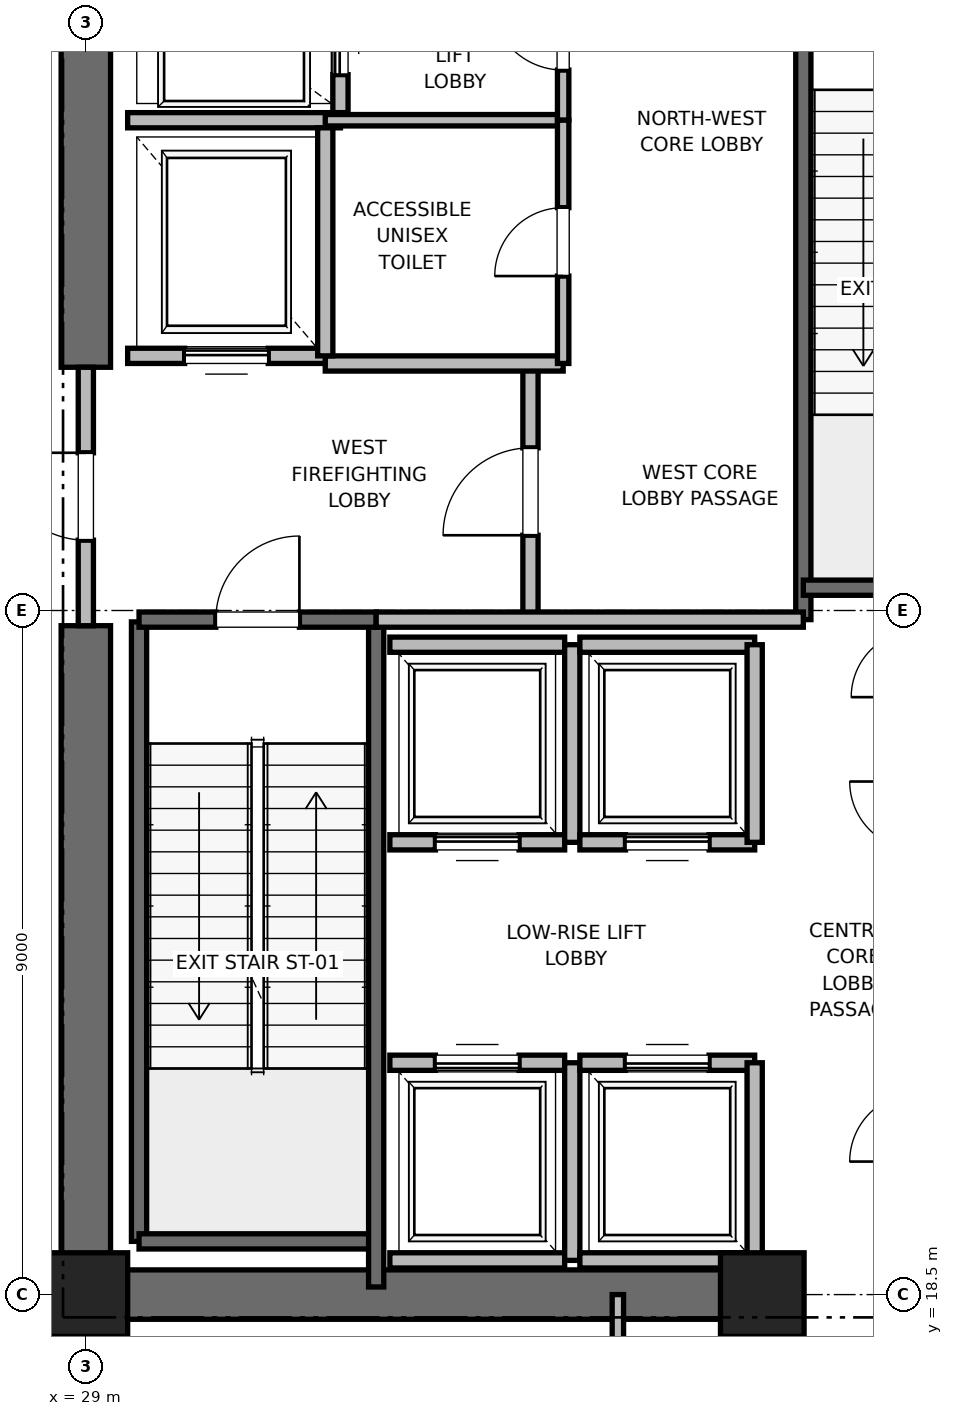
"""IFC4 building model, lengths in metres.
Left out: names, types, materials, properties, quantities, classifications, styles, units other than length and angle.
Written with IfcOpenShell. Run it as: python <this file> out.ifc"""

import sys

from ifc_helpers import new_model, si_unit, direction, frame, frame_2d, origin, origin_2d, place, context, subcontext, project, spatial, rectangle, extrude, element, fill, save


model = new_model("IFC4")
c1 = context("Model", 3, precision=1e-05, world=origin(), true_north=direction((0.0, 1.0)))
c2 = subcontext(c1, "Body", "Model", "MODEL_VIEW")
j1 = project(units=[si_unit("LENGTHUNIT", "METRE"), si_unit("PLANEANGLEUNIT", "RADIAN")], contexts=[c1])
p1 = place(None, origin())
s1 = spatial("IfcSite", under=j1, at=p1, CompositionType="ELEMENT")
p2 = place(p1, origin())
s2 = spatial("IfcBuilding", under=s1, at=p2, CompositionType="ELEMENT")
p3 = place(p2, frame((0.0, 0.0, 107.6)))
s3 = spatial("IfcBuildingStorey", under=s2, at=p3, CompositionType="ELEMENT", Elevation=107.6)
for number, where, z_axis, x_axis in (
    (1, (29.0, 18.5, 0.0), (0.0, 0.0, 1.0), (1.0, 0.0, 0.0)),
    (2, (37.9, 18.5, 0.0), (0.0, 0.0, 1.0), (1.0, 0.0, 0.0)),
):
    element("IfcColumn", number, at=place(p3, frame(where, z_axis=z_axis, x_axis=x_axis)), inside=s3, PredefinedType="PILASTER", context=c2, shape_type="SweptSolid", body=[
        extrude(rectangle(XDim=1.1, YDim=1.1, at=origin_2d()), origin(), (0.0, 0.0, 1.0), 5.4),
    ])
p4 = place(p3, frame((29.0, 18.5, 0.0), z_axis=(0.0, 0.0, 1.0), x_axis=(1.0, 0.0, 0.0)))
e3 = element("IfcWall", 3, at=p4, inside=s3, PredefinedType="SHEAR", context=c2, shape_type="SweptSolid", body=[
    extrude(rectangle(XDim=9.2, YDim=0.65, at=frame_2d((4.6, 0.0))), origin(), (0.0, 0.0, 1.0), 5.1),
])
p5 = place(p3, frame((29.0, 18.5, 0.0), z_axis=(0.0, 0.0, 1.0), x_axis=(0.0, 1.0, 0.0)))
e4 = element("IfcWall", 4, at=p5, inside=s3, PredefinedType="SHEAR", context=c2, shape_type="SweptSolid", body=[
    extrude(rectangle(XDim=8.8, YDim=0.65, at=frame_2d((4.4, 0.0))), origin(), (0.0, 0.0, 1.0), 5.1),
])
p6 = place(p3, frame((29.0, 30.7, 0.0), z_axis=(0.0, 0.0, 1.0), x_axis=(0.0, 1.0, 0.0)))
e5 = element("IfcWall", 5, at=p6, inside=s3, PredefinedType="SHEAR", context=c2, shape_type="SweptSolid", body=[
    extrude(rectangle(XDim=5.8, YDim=0.65, at=frame_2d((2.9, 0.0))), origin(), (0.0, 0.0, 1.0), 5.1),
])
p7 = place(p3, frame((29.7, 19.2, 0.0), z_axis=(0.0, 0.0, 1.0), x_axis=(0.0, 1.0, 0.0)))
e6 = element("IfcWall", 6, at=p7, inside=s3, PredefinedType="SOLIDWALL", context=c2, shape_type="SweptSolid", body=[
    extrude(rectangle(XDim=8.15, YDim=0.2, at=frame_2d((4.075, 0.0))), origin(), (0.0, 0.0, 1.0), 5.1),
])
p8 = place(p3, frame((29.7, 19.2, 0.0), z_axis=(0.0, 0.0, 1.0), x_axis=(1.0, 0.0, 0.0)))
e7 = element("IfcWall", 7, at=p8, inside=s3, PredefinedType="SOLIDWALL", context=c2, shape_type="SweptSolid", body=[
    extrude(rectangle(XDim=3.12, YDim=0.2, at=frame_2d((1.56, 0.0))), origin(), (0.0, 0.0, 1.0), 5.1),
])
p9 = place(p3, frame((32.82, 18.6, 0.0), z_axis=(0.0, 0.0, 1.0), x_axis=(0.0, 1.0, 0.0)))
e8 = element("IfcWall", 8, at=p9, inside=s3, PredefinedType="SOLIDWALL", context=c2, shape_type="SweptSolid", body=[
    extrude(rectangle(XDim=8.78, YDim=0.2, at=frame_2d((4.39, 0.0))), origin(), (0.0, 0.0, 1.0), 5.1),
])
p10 = place(p3, frame((29.7, 27.38, 0.0), z_axis=(0.0, 0.0, 1.0), x_axis=(1.0, 0.0, 0.0)))
e9 = element("IfcWall", 9, at=p10, inside=s3, PredefinedType="SOLIDWALL", context=c2, shape_type="SweptSolid", body=[
    extrude(rectangle(XDim=3.12, YDim=0.2, at=frame_2d((1.56, 0.0))), origin(), (0.0, 0.0, 1.0), 5.1),
])
p11 = place(p10, frame((1.01, 0.0, 0.0)))
e10 = element("IfcOpeningElement", 10, at=p11, cuts=e9, PredefinedType="OPENING", context=c2, shape_type="SweptSolid", body=[
    extrude(rectangle(XDim=1.1, YDim=2.15, at=frame_2d((0.55, 1.075))), frame((0.0, 0.1, 0.0), z_axis=(0.0, -1.0, 0.0), x_axis=(1.0, 0.0, 0.0)), (0.0, 0.0, 1.0), 0.2),
])
p12 = place(p3, frame((38.44, 27.38, 0.0), z_axis=(0.0, 0.0, 1.0), x_axis=(0.0, 1.0, 0.0)))
e11 = element("IfcWall", 11, at=p12, inside=s3, PredefinedType="SOLIDWALL", context=c2, shape_type="SweptSolid", body=[
    extrude(rectangle(XDim=8.87, YDim=0.2, at=frame_2d((4.435, 0.0))), origin(), (0.0, 0.0, 1.0), 5.1),
])
p13 = place(p3, frame((38.44, 27.8, 0.0), z_axis=(0.0, 0.0, 1.0), x_axis=(1.0, 0.0, 0.0)))
e12 = element("IfcWall", 12, at=p13, inside=s3, PredefinedType="SOLIDWALL", context=c2, shape_type="SweptSolid", body=[
    extrude(rectangle(XDim=3.32, YDim=0.2, at=frame_2d((1.66, 0.0))), origin(), (0.0, 0.0, 1.0), 5.1),
])
p14 = place(p3, frame((34.85, 27.38, 0.0), z_axis=(0.0, 0.0, 1.0), x_axis=(0.0, 1.0, 0.0)))
e13 = element("IfcWall", 13, at=p14, inside=s3, PredefinedType="PARTITIONING", context=c2, shape_type="SweptSolid", body=[
    extrude(rectangle(XDim=3.37, YDim=0.2, at=frame_2d((1.685, 0.0))), origin(), (0.0, 0.0, 1.0), 5.1),
])
p15 = place(p14, frame((1.11, 0.0, 0.0)))
e14 = element("IfcOpeningElement", 14, at=p15, cuts=e13, PredefinedType="OPENING", context=c2, shape_type="SweptSolid", body=[
    extrude(rectangle(XDim=1.15, YDim=2.2, at=frame_2d((0.575, 1.1))), frame((0.0, 0.1, 0.0), z_axis=(0.0, -1.0, 0.0), x_axis=(1.0, 0.0, 0.0)), (0.0, 0.0, 1.0), 0.2),
])
p16 = place(p3, frame((29.0, 27.3, 0.0), z_axis=(0.0, 0.0, 1.0), x_axis=(0.0, 1.0, 0.0)))
e15 = element("IfcWall", 15, at=p16, inside=s3, PredefinedType="PARTITIONING", context=c2, shape_type="SweptSolid", body=[
    extrude(rectangle(XDim=3.4, YDim=0.2, at=frame_2d((1.7, 0.0))), origin(), (0.0, 0.0, 1.0), 3.88),
])
p17 = place(p16, frame((1.125, 0.0, 0.0)))
e16 = element("IfcOpeningElement", 16, at=p17, cuts=e15, PredefinedType="OPENING", context=c2, shape_type="SweptSolid", body=[
    extrude(rectangle(XDim=1.15, YDim=2.2, at=frame_2d((0.575, 1.1))), frame((0.0, 0.1, 0.0), z_axis=(0.0, -1.0, 0.0), x_axis=(1.0, 0.0, 0.0)), (0.0, 0.0, 1.0), 0.2),
])
p18 = place(p3, frame((32.82, 27.38, 0.0), z_axis=(0.0, 0.0, 1.0), x_axis=(1.0, 0.0, 0.0)))
e17 = element("IfcWall", 17, at=p18, inside=s3, PredefinedType="PARTITIONING", context=c2, shape_type="SweptSolid", body=[
    extrude(rectangle(XDim=5.62, YDim=0.2, at=frame_2d((2.81, 0.0))), origin(), (0.0, 0.0, 1.0), 5.1),
])
p19 = place(p3, frame((32.15, 30.75, 0.0), z_axis=(0.0, 0.0, 1.0), x_axis=(1.0, 0.0, 0.0)))
e18 = element("IfcWall", 18, at=p19, inside=s3, PredefinedType="PARTITIONING", context=c2, shape_type="SweptSolid", body=[
    extrude(rectangle(XDim=3.13, YDim=0.2, at=frame_2d((1.565, 0.0))), origin(), (0.0, 0.0, 1.0), 5.1),
])
p20 = place(p3, frame((29.55, 30.85, 0.0), z_axis=(0.0, 0.0, 1.0), x_axis=(1.0, 0.0, 0.0)))
e19 = element("IfcWall", 19, at=p20, inside=s3, PredefinedType="SOLIDWALL", context=c2, shape_type="SweptSolid", body=[
    extrude(rectangle(XDim=2.6, YDim=0.2, at=frame_2d((1.3, 0.0))), origin(), (0.0, 0.0, 1.0), 3.88),
])
p21 = place(p20, frame((0.75, 0.0, 0.0)))
e20 = element("IfcOpeningElement", 20, at=p21, cuts=e19, PredefinedType="OPENING", context=c2, shape_type="SweptSolid", body=[
    extrude(rectangle(XDim=1.1, YDim=2.2, at=frame_2d((0.55, 1.1))), frame((0.0, 0.1, 0.0), z_axis=(0.0, -1.0, 0.0), x_axis=(1.0, 0.0, 0.0)), (0.0, 0.0, 1.0), 0.2),
])
p22 = place(p3, frame((29.55, 33.95, 0.0), z_axis=(0.0, 0.0, 1.0), x_axis=(1.0, 0.0, 0.0)))
e21 = element("IfcWall", 21, at=p22, inside=s3, PredefinedType="SOLIDWALL", context=c2, shape_type="SweptSolid", body=[
    extrude(rectangle(XDim=2.8, YDim=0.2, at=frame_2d((1.4, 0.0))), origin(), (0.0, 0.0, 1.0), 5.1),
])
p23 = place(p3, frame((32.15, 30.85, 0.0), z_axis=(0.0, 0.0, 1.0), x_axis=(0.0, 1.0, 0.0)))
e22 = element("IfcWall", 22, at=p23, inside=s3, PredefinedType="SOLIDWALL", context=c2, shape_type="SweptSolid", body=[
    extrude(rectangle(XDim=3.0, YDim=0.2, at=frame_2d((1.5, 0.0))), origin(), (0.0, 0.0, 1.0), 5.1),
])
p24 = place(p3, frame((32.35, 34.05, 0.0), z_axis=(0.0, 0.0, 1.0), x_axis=(0.0, 1.0, 0.0)))
e23 = element("IfcWall", 23, at=p24, inside=s3, PredefinedType="SOLIDWALL", context=c2, shape_type="SweptSolid", body=[
    extrude(rectangle(XDim=2.1, YDim=0.2, at=frame_2d((1.05, 0.0))), origin(), (0.0, 0.0, 1.0), 5.1),
])
p25 = place(p24, frame((0.5, 0.0, 0.0)))
e24 = element("IfcOpeningElement", 24, at=p25, cuts=e23, PredefinedType="OPENING", context=c2, shape_type="SweptSolid", body=[
    extrude(rectangle(XDim=1.1, YDim=2.2, at=frame_2d((0.55, 1.1))), frame((0.0, 0.1, 0.0), z_axis=(0.0, -1.0, 0.0), x_axis=(1.0, 0.0, 0.0)), (0.0, 0.0, 1.0), 0.2),
])
p26 = place(p3, frame((33.0, 18.95, 0.0), z_axis=(0.0, 0.0, 1.0), x_axis=(1.0, 0.0, 0.0)))
e25 = element("IfcWall", 25, at=p26, inside=s3, PredefinedType="SOLIDWALL", context=c2, shape_type="SweptSolid", body=[
    extrude(rectangle(XDim=2.3, YDim=0.2, at=frame_2d((1.15, 0.0))), origin(), (0.0, 0.0, 1.0), 5.1),
])
p27 = place(p3, frame((35.3, 21.55, 0.0), z_axis=(0.0, 0.0, 1.0), x_axis=(-1.0, 0.0, 0.0)))
e26 = element("IfcWall", 26, at=p27, inside=s3, PredefinedType="SOLIDWALL", context=c2, shape_type="SweptSolid", body=[
    extrude(rectangle(XDim=2.3, YDim=0.2, at=frame_2d((1.15, 0.0))), origin(), (0.0, 0.0, 1.0), 5.1),
])
p28 = place(p27, frame((0.6, 0.0, 0.0)))
e27 = element("IfcOpeningElement", 27, at=p28, cuts=e26, PredefinedType="OPENING", context=c2, shape_type="SweptSolid", body=[
    extrude(rectangle(XDim=1.1, YDim=2.2, at=frame_2d((0.55, 1.1))), frame((0.0, 0.1, 0.0), z_axis=(0.0, -1.0, 0.0), x_axis=(1.0, 0.0, 0.0)), (0.0, 0.0, 1.0), 0.2),
])
p29 = place(p3, frame((35.4, 18.95, 0.0), z_axis=(0.0, 0.0, 1.0), x_axis=(0.0, 1.0, 0.0)))
e28 = element("IfcWall", 28, at=p29, inside=s3, PredefinedType="SOLIDWALL", context=c2, shape_type="SweptSolid", body=[
    extrude(rectangle(XDim=2.6, YDim=0.2, at=frame_2d((1.3, 0.0))), origin(), (0.0, 0.0, 1.0), 5.1),
])
p30 = place(p3, frame((35.5, 18.95, 0.0), z_axis=(0.0, 0.0, 1.0), x_axis=(1.0, 0.0, 0.0)))
e29 = element("IfcWall", 29, at=p30, inside=s3, PredefinedType="SOLIDWALL", context=c2, shape_type="SweptSolid", body=[
    extrude(rectangle(XDim=2.3, YDim=0.2, at=frame_2d((1.15, 0.0))), origin(), (0.0, 0.0, 1.0), 3.88),
])
p31 = place(p3, frame((37.8, 21.55, 0.0), z_axis=(0.0, 0.0, 1.0), x_axis=(-1.0, 0.0, 0.0)))
e30 = element("IfcWall", 30, at=p31, inside=s3, PredefinedType="SOLIDWALL", context=c2, shape_type="SweptSolid", body=[
    extrude(rectangle(XDim=2.3, YDim=0.2, at=frame_2d((1.15, 0.0))), origin(), (0.0, 0.0, 1.0), 5.1),
])
p32 = place(p31, frame((0.6, 0.0, 0.0)))
e31 = element("IfcOpeningElement", 31, at=p32, cuts=e30, PredefinedType="OPENING", context=c2, shape_type="SweptSolid", body=[
    extrude(rectangle(XDim=1.1, YDim=2.2, at=frame_2d((0.55, 1.1))), frame((0.0, 0.1, 0.0), z_axis=(0.0, -1.0, 0.0), x_axis=(1.0, 0.0, 0.0)), (0.0, 0.0, 1.0), 0.2),
])
p33 = place(p3, frame((37.8, 18.95, 0.0), z_axis=(0.0, 0.0, 1.0), x_axis=(0.0, 1.0, 0.0)))
e32 = element("IfcWall", 32, at=p33, inside=s3, PredefinedType="SOLIDWALL", context=c2, shape_type="SweptSolid", body=[
    extrude(rectangle(XDim=2.6, YDim=0.2, at=frame_2d((1.3, 0.0))), origin(), (0.0, 0.0, 1.0), 3.88),
])
p34 = place(p3, frame((33.0, 24.45, 0.0), z_axis=(0.0, 0.0, 1.0), x_axis=(1.0, 0.0, 0.0)))
e33 = element("IfcWall", 33, at=p34, inside=s3, PredefinedType="SOLIDWALL", context=c2, shape_type="SweptSolid", body=[
    extrude(rectangle(XDim=2.3, YDim=0.2, at=frame_2d((1.15, 0.0))), origin(), (0.0, 0.0, 1.0), 5.1),
])
p35 = place(p34, frame((0.6, 0.0, 0.0)))
e34 = element("IfcOpeningElement", 34, at=p35, cuts=e33, PredefinedType="OPENING", context=c2, shape_type="SweptSolid", body=[
    extrude(rectangle(XDim=1.1, YDim=2.2, at=frame_2d((0.55, 1.1))), frame((0.0, 0.1, 0.0), z_axis=(0.0, -1.0, 0.0), x_axis=(1.0, 0.0, 0.0)), (0.0, 0.0, 1.0), 0.2),
])
p36 = place(p3, frame((35.3, 27.05, 0.0), z_axis=(0.0, 0.0, 1.0), x_axis=(-1.0, 0.0, 0.0)))
e35 = element("IfcWall", 35, at=p36, inside=s3, PredefinedType="SOLIDWALL", context=c2, shape_type="SweptSolid", body=[
    extrude(rectangle(XDim=2.3, YDim=0.2, at=frame_2d((1.15, 0.0))), origin(), (0.0, 0.0, 1.0), 5.1),
])
p37 = place(p3, frame((35.4, 24.45, 0.0), z_axis=(0.0, 0.0, 1.0), x_axis=(0.0, 1.0, 0.0)))
e36 = element("IfcWall", 36, at=p37, inside=s3, PredefinedType="SOLIDWALL", context=c2, shape_type="SweptSolid", body=[
    extrude(rectangle(XDim=2.6, YDim=0.2, at=frame_2d((1.3, 0.0))), origin(), (0.0, 0.0, 1.0), 5.1),
])
p38 = place(p3, frame((35.5, 24.45, 0.0), z_axis=(0.0, 0.0, 1.0), x_axis=(1.0, 0.0, 0.0)))
e37 = element("IfcWall", 37, at=p38, inside=s3, PredefinedType="SOLIDWALL", context=c2, shape_type="SweptSolid", body=[
    extrude(rectangle(XDim=2.3, YDim=0.2, at=frame_2d((1.15, 0.0))), origin(), (0.0, 0.0, 1.0), 5.1),
])
p39 = place(p38, frame((0.6, 0.0, 0.0)))
e38 = element("IfcOpeningElement", 38, at=p39, cuts=e37, PredefinedType="OPENING", context=c2, shape_type="SweptSolid", body=[
    extrude(rectangle(XDim=1.1, YDim=2.2, at=frame_2d((0.55, 1.1))), frame((0.0, 0.1, 0.0), z_axis=(0.0, -1.0, 0.0), x_axis=(1.0, 0.0, 0.0)), (0.0, 0.0, 1.0), 0.2),
])
p40 = place(p3, frame((37.8, 27.05, 0.0), z_axis=(0.0, 0.0, 1.0), x_axis=(-1.0, 0.0, 0.0)))
e39 = element("IfcWall", 39, at=p40, inside=s3, PredefinedType="SOLIDWALL", context=c2, shape_type="SweptSolid", body=[
    extrude(rectangle(XDim=2.3, YDim=0.2, at=frame_2d((1.15, 0.0))), origin(), (0.0, 0.0, 1.0), 5.1),
])
p41 = place(p3, frame((37.8, 24.45, 0.0), z_axis=(0.0, 0.0, 1.0), x_axis=(0.0, 1.0, 0.0)))
e40 = element("IfcWall", 40, at=p41, inside=s3, PredefinedType="SOLIDWALL", context=c2, shape_type="SweptSolid", body=[
    extrude(rectangle(XDim=2.6, YDim=0.2, at=frame_2d((1.3, 0.0))), origin(), (0.0, 0.0, 1.0), 5.1),
])
p42 = place(p3, frame((32.15, 33.95, 0.0), z_axis=(0.0, 0.0, 1.0), x_axis=(1.0, 0.0, 0.0)))
e41 = element("IfcWall", 41, at=p42, inside=s3, PredefinedType="PARTITIONING", context=c2, shape_type="SweptSolid", body=[
    extrude(rectangle(XDim=3.13, YDim=0.15, at=frame_2d((1.565, 0.0))), origin(), (0.0, 0.0, 1.0), 2.85),
])
p43 = place(p3, frame((35.28, 33.95, 0.0), z_axis=(0.0, 0.0, 1.0), x_axis=(0.0, 1.0, 0.0)))
e42 = element("IfcWall", 42, at=p43, inside=s3, PredefinedType="PARTITIONING", context=c2, shape_type="SweptSolid", body=[
    extrude(rectangle(XDim=2.27, YDim=0.15, at=frame_2d((1.135, 0.0))), origin(), (0.0, 0.0, 1.0), 2.85),
])
p44 = place(p43, frame((0.66, 0.0, 0.0)))
e43 = element("IfcOpeningElement", 43, at=p44, cuts=e42, PredefinedType="OPENING", context=c2, shape_type="SweptSolid", body=[
    extrude(rectangle(XDim=0.95, YDim=2.15, at=frame_2d((0.475, 1.075))), frame((0.0, 0.075, 0.0), z_axis=(0.0, -1.0, 0.0), x_axis=(1.0, 0.0, 0.0)), (0.0, 0.0, 1.0), 0.15),
])
p45 = place(p3, frame((35.28, 30.75, 0.0), z_axis=(0.0, 0.0, 1.0), x_axis=(0.0, 1.0, 0.0)))
e44 = element("IfcWall", 44, at=p45, inside=s3, PredefinedType="PARTITIONING", context=c2, shape_type="SweptSolid", body=[
    extrude(rectangle(XDim=3.2, YDim=0.15, at=frame_2d((1.6, 0.0))), origin(), (0.0, 0.0, 1.0), 2.85),
])
p46 = place(p45, frame((1.15, 0.0, 0.0)))
e45 = element("IfcOpeningElement", 45, at=p46, cuts=e44, PredefinedType="OPENING", context=c2, shape_type="SweptSolid", body=[
    extrude(rectangle(XDim=0.9, YDim=2.1, at=frame_2d((0.45, 1.05))), frame((0.0, 0.075, 0.0), z_axis=(0.0, -1.0, 0.0), x_axis=(1.0, 0.0, 0.0)), (0.0, 0.0, 1.0), 0.15),
])
p47 = place(p3, frame((36.0, 15.8, 0.0), z_axis=(0.0, 0.0, 1.0), x_axis=(0.0, 1.0, 0.0)))
e46 = element("IfcWall", 46, at=p47, inside=s3, PredefinedType="PARTITIONING", context=c2, shape_type="SweptSolid", body=[
    extrude(rectangle(XDim=2.7, YDim=0.15, at=frame_2d((1.35, 0.0))), origin(), (0.0, 0.0, 1.0), 2.85),
])
p48 = place(p47, frame((0.875, 0.0, 0.0)))
e47 = element("IfcOpeningElement", 47, at=p48, cuts=e46, PredefinedType="OPENING", context=c2, shape_type="SweptSolid", body=[
    extrude(rectangle(XDim=0.95, YDim=2.15, at=frame_2d((0.475, 1.075))), frame((0.0, 0.075, 0.0), z_axis=(0.0, -1.0, 0.0), x_axis=(1.0, 0.0, 0.0)), (0.0, 0.0, 1.0), 0.15),
])
p49 = place(p11, origin())
e48 = element("IfcDoor", 48, at=p49, inside=s3, OperationType="SINGLE_SWING_RIGHT", PredefinedType="DOOR", context=c2, shape_type="SweptSolid", body=[
    extrude(rectangle(XDim=1.1, YDim=2.15, at=frame_2d((0.55, 1.075))), frame((0.0, 0.025, 0.0), z_axis=(0.0, -1.0, 0.0), x_axis=(1.0, 0.0, 0.0)), (0.0, 0.0, 1.0), 0.05),
])
fill(e10, e48)
p50 = place(p15, origin())
e49 = element("IfcDoor", 49, at=p50, inside=s3, OperationType="SINGLE_SWING_LEFT", PredefinedType="DOOR", context=c2, shape_type="SweptSolid", body=[
    extrude(rectangle(XDim=1.15, YDim=2.2, at=frame_2d((0.575, 1.1))), frame((0.0, 0.025, 0.0), z_axis=(0.0, -1.0, 0.0), x_axis=(1.0, 0.0, 0.0)), (0.0, 0.0, 1.0), 0.05),
])
fill(e14, e49)
p51 = place(p17, origin())
e50 = element("IfcDoor", 50, at=p51, inside=s3, OperationType="SINGLE_SWING_RIGHT", PredefinedType="DOOR", context=c2, shape_type="SweptSolid", body=[
    extrude(rectangle(XDim=1.15, YDim=2.2, at=frame_2d((0.575, 1.1))), frame((0.0, 0.025, 0.0), z_axis=(0.0, -1.0, 0.0), x_axis=(1.0, 0.0, 0.0)), (0.0, 0.0, 1.0), 0.05),
])
fill(e16, e50)
p52 = place(p21, origin())
e51 = element("IfcDoor", 51, at=p52, inside=s3, OperationType="SLIDING_TO_RIGHT", PredefinedType="DOOR", context=c2, shape_type="SweptSolid", body=[
    extrude(rectangle(XDim=1.1, YDim=2.2, at=frame_2d((0.55, 1.1))), frame((0.0, 0.025, 0.0), z_axis=(0.0, -1.0, 0.0), x_axis=(1.0, 0.0, 0.0)), (0.0, 0.0, 1.0), 0.05),
])
fill(e20, e51)
p53 = place(p25, origin())
e52 = element("IfcDoor", 52, at=p53, inside=s3, OperationType="SLIDING_TO_RIGHT", PredefinedType="DOOR", context=c2, shape_type="SweptSolid", body=[
    extrude(rectangle(XDim=1.1, YDim=2.2, at=frame_2d((0.55, 1.1))), frame((0.0, 0.025, 0.0), z_axis=(0.0, -1.0, 0.0), x_axis=(1.0, 0.0, 0.0)), (0.0, 0.0, 1.0), 0.05),
])
fill(e24, e52)
p54 = place(p28, origin())
e53 = element("IfcDoor", 53, at=p54, inside=s3, OperationType="SLIDING_TO_RIGHT", PredefinedType="DOOR", context=c2, shape_type="SweptSolid", body=[
    extrude(rectangle(XDim=1.1, YDim=2.2, at=frame_2d((0.55, 1.1))), frame((0.0, 0.025, 0.0), z_axis=(0.0, -1.0, 0.0), x_axis=(1.0, 0.0, 0.0)), (0.0, 0.0, 1.0), 0.05),
])
fill(e27, e53)
p55 = place(p32, origin())
e54 = element("IfcDoor", 54, at=p55, inside=s3, OperationType="SLIDING_TO_RIGHT", PredefinedType="DOOR", context=c2, shape_type="SweptSolid", body=[
    extrude(rectangle(XDim=1.1, YDim=2.2, at=frame_2d((0.55, 1.1))), frame((0.0, 0.025, 0.0), z_axis=(0.0, -1.0, 0.0), x_axis=(1.0, 0.0, 0.0)), (0.0, 0.0, 1.0), 0.05),
])
fill(e31, e54)
p56 = place(p35, origin())
e55 = element("IfcDoor", 55, at=p56, inside=s3, OperationType="SLIDING_TO_RIGHT", PredefinedType="DOOR", context=c2, shape_type="SweptSolid", body=[
    extrude(rectangle(XDim=1.1, YDim=2.2, at=frame_2d((0.55, 1.1))), frame((0.0, 0.025, 0.0), z_axis=(0.0, -1.0, 0.0), x_axis=(1.0, 0.0, 0.0)), (0.0, 0.0, 1.0), 0.05),
])
fill(e34, e55)
p57 = place(p39, origin())
e56 = element("IfcDoor", 56, at=p57, inside=s3, OperationType="SLIDING_TO_RIGHT", PredefinedType="DOOR", context=c2, shape_type="SweptSolid", body=[
    extrude(rectangle(XDim=1.1, YDim=2.2, at=frame_2d((0.55, 1.1))), frame((0.0, 0.025, 0.0), z_axis=(0.0, -1.0, 0.0), x_axis=(1.0, 0.0, 0.0)), (0.0, 0.0, 1.0), 0.05),
])
fill(e38, e56)
p58 = place(p44, origin())
e57 = element("IfcDoor", 57, at=p58, inside=s3, OperationType="SINGLE_SWING_RIGHT", PredefinedType="DOOR", context=c2, shape_type="SweptSolid", body=[
    extrude(rectangle(XDim=0.95, YDim=2.15, at=frame_2d((0.475, 1.075))), frame((0.0, 0.025, 0.0), z_axis=(0.0, -1.0, 0.0), x_axis=(1.0, 0.0, 0.0)), (0.0, 0.0, 1.0), 0.05),
])
fill(e43, e57)
p59 = place(p46, origin())
e58 = element("IfcDoor", 58, at=p59, inside=s3, OperationType="SINGLE_SWING_LEFT", PredefinedType="DOOR", context=c2, shape_type="SweptSolid", body=[
    extrude(rectangle(XDim=0.9, YDim=2.1, at=frame_2d((0.45, 1.05))), frame((0.0, 0.025, 0.0), z_axis=(0.0, -1.0, 0.0), x_axis=(1.0, 0.0, 0.0)), (0.0, 0.0, 1.0), 0.05),
])
fill(e45, e58)
save(model, sys.argv[1])
